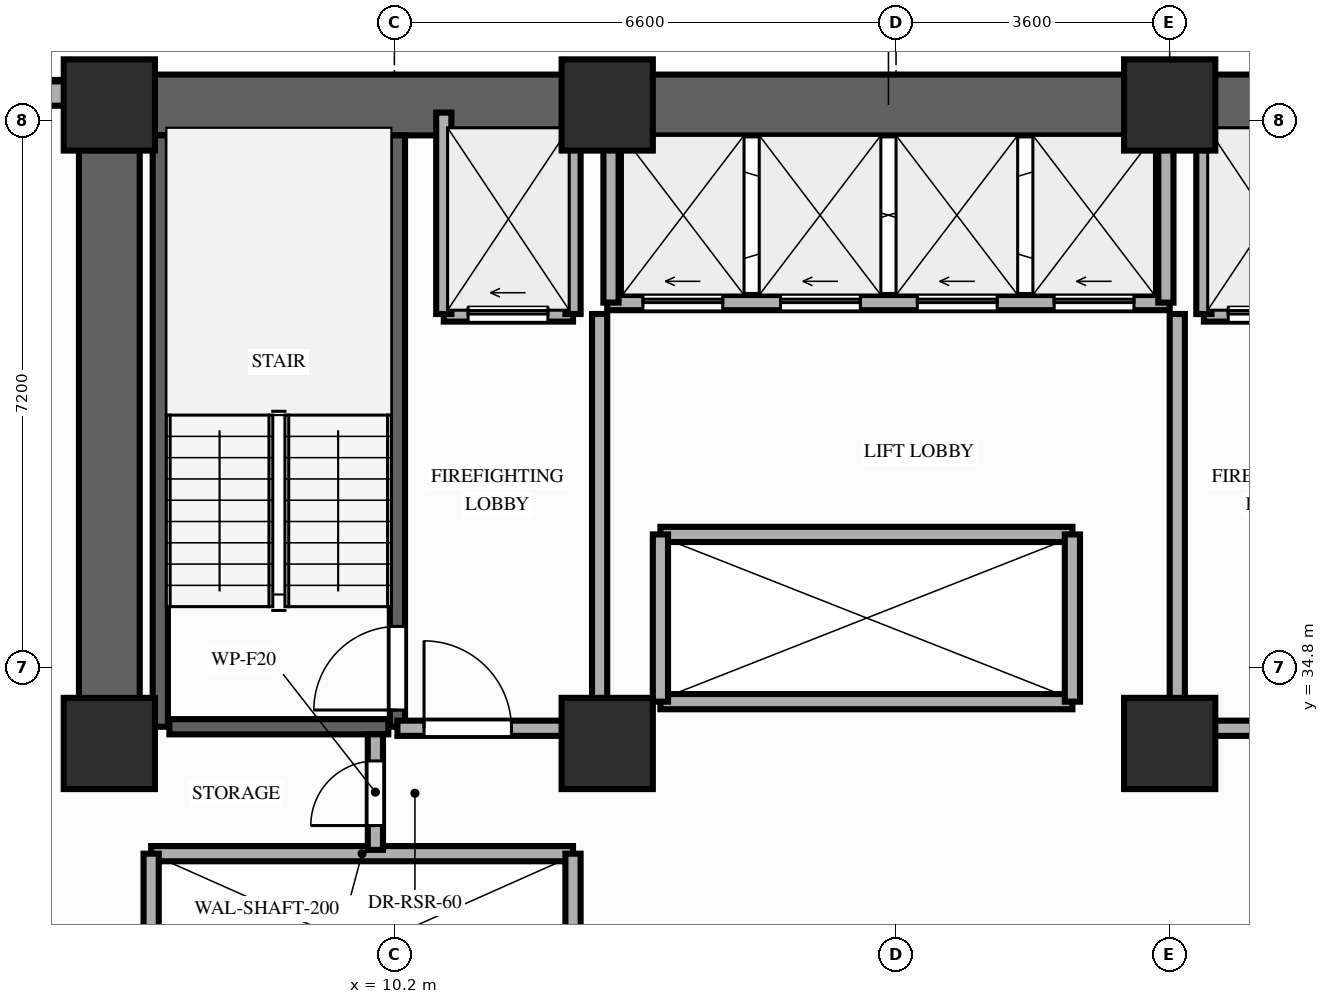
"""IFC4 building model, lengths in metres.
Left out: names, types, materials, properties, quantities, classifications, styles, units other than length and angle.
Written with IfcOpenShell. Run it as: python <this file> out.ifc"""

import sys

from ifc_helpers import new_model, si_unit, direction, frame, frame_2d, origin, origin_2d, place, context, subcontext, project, spatial, rectangle, extrude, element, fill, save


model = new_model("IFC4")
c1 = context("Model", 3, precision=1e-05, world=origin(), true_north=direction((0.0, 1.0)))
c2 = subcontext(c1, "Body", "Model", "MODEL_VIEW")
j1 = project(units=[si_unit("LENGTHUNIT", "METRE"), si_unit("PLANEANGLEUNIT", "RADIAN")], contexts=[c1])
p1 = place(None, origin())
s1 = spatial("IfcSite", under=j1, at=p1, CompositionType="ELEMENT")
p2 = place(p1, origin())
s2 = spatial("IfcBuilding", under=s1, at=p2, CompositionType="ELEMENT")
p3 = place(p2, frame((0.0, 0.0, 56.4)))
s3 = spatial("IfcBuildingStorey", under=s2, at=p3, CompositionType="ELEMENT", Elevation=56.4)
for number, where, z_axis, x_axis in (
    (1, (6.45, 33.8, 0.0), (0.0, 0.0, 1.0), (1.0, 0.0, 0.0)),
    (2, (13.0, 33.8, 0.0), (0.0, 0.0, 1.0), (1.0, 0.0, 0.0)),
    (3, (20.4, 33.8, 0.0), (0.0, 0.0, 1.0), (1.0, 0.0, 0.0)),
    (4, (6.45, 42.2, 0.0), (0.0, 0.0, 1.0), (1.0, 0.0, 0.0)),
    (5, (13.0, 42.2, 0.0), (0.0, 0.0, 1.0), (1.0, 0.0, 0.0)),
    (6, (20.4, 42.2, 0.0), (0.0, 0.0, 1.0), (1.0, 0.0, 0.0)),
):
    element("IfcColumn", number, at=place(p3, frame(where, z_axis=z_axis, x_axis=x_axis)), inside=s3, PredefinedType="COLUMN", context=c2, shape_type="SweptSolid", body=[
        extrude(rectangle(XDim=1.2, YDim=1.2, at=origin_2d()), origin(), (0.0, 0.0, 1.0), 3.2),
    ])
p4 = place(p3, frame((6.0, 42.35, 0.0), z_axis=(0.0, 0.0, 1.0), x_axis=(-1.0, 0.0, 0.0)))
e7 = element("IfcWall", 7, at=p4, inside=s3, PredefinedType="STANDARD", context=c2, shape_type="SweptSolid", body=[
    extrude(rectangle(XDim=2.0, YDim=0.32, at=frame_2d((1.0, 0.0))), origin(), (0.0, 0.0, 1.0), 3.02),
])
p5 = place(p3, frame((6.45, 42.2, 0.0), z_axis=(0.0, 0.0, 1.0), x_axis=(1.0, 0.0, 0.0)))
e8 = element("IfcWall", 8, at=p5, inside=s3, PredefinedType="SHEAR", context=c2, shape_type="SweptSolid", body=[
    extrude(rectangle(XDim=20.45, YDim=0.8, at=frame_2d((10.225, 0.0))), origin(), (0.0, 0.0, 1.0), 3.02),
])
p6 = place(p3, frame((6.45, 33.8, 0.0), z_axis=(0.0, 0.0, 1.0), x_axis=(0.0, 1.0, 0.0)))
e9 = element("IfcWall", 9, at=p6, inside=s3, PredefinedType="SHEAR", context=c2, shape_type="SweptSolid", body=[
    extrude(rectangle(XDim=7.95, YDim=0.8, at=frame_2d((3.975, 0.0))), origin(), (0.0, 0.0, 1.0), 3.02),
])
p7 = place(p3, frame((7.12, 34.02, 0.0), z_axis=(0.0, 0.0, 1.0), x_axis=(0.0, 1.0, 0.0)))
e10 = element("IfcWall", 10, at=p7, inside=s3, PredefinedType="SHEAR", context=c2, shape_type="SweptSolid", body=[
    extrude(rectangle(XDim=7.78, YDim=0.2, at=frame_2d((3.89, 0.0))), origin(), (0.0, 0.0, 1.0), 3.02),
])
p8 = place(p3, frame((10.24, 34.02, 0.0), z_axis=(0.0, 0.0, 1.0), x_axis=(0.0, 1.0, 0.0)))
e11 = element("IfcWall", 11, at=p8, inside=s3, PredefinedType="SHEAR", context=c2, shape_type="SweptSolid", body=[
    extrude(rectangle(XDim=7.78, YDim=0.2, at=frame_2d((3.89, 0.0))), origin(), (0.0, 0.0, 1.0), 3.02),
])
p9 = place(p8, frame((0.22, 0.0, 0.0)))
e12 = element("IfcOpeningElement", 12, at=p9, cuts=e11, PredefinedType="OPENING", context=c2, shape_type="SweptSolid", body=[
    extrude(rectangle(XDim=1.1, YDim=2.15, at=frame_2d((0.55, 1.075))), frame((0.0, 0.11, 0.0), z_axis=(0.0, -1.0, 0.0), x_axis=(1.0, 0.0, 0.0)), (0.0, 0.0, 1.0), 0.22),
])
p10 = place(p3, frame((7.24, 34.02, 0.0), z_axis=(0.0, 0.0, 1.0), x_axis=(1.0, 0.0, 0.0)))
e13 = element("IfcWall", 13, at=p10, inside=s3, PredefinedType="SHEAR", context=c2, shape_type="SweptSolid", body=[
    extrude(rectangle(XDim=2.88, YDim=0.2, at=frame_2d((1.44, 0.0))), origin(), (0.0, 0.0, 1.0), 3.02),
])
p11 = place(p3, frame((7.0, 32.35, 0.0), z_axis=(0.0, 0.0, 1.0), x_axis=(1.0, 0.0, 0.0)))
e14 = element("IfcWall", 14, at=p11, inside=s3, PredefinedType="MOVABLE", context=c2, shape_type="SweptSolid", body=[
    extrude(rectangle(XDim=5.55, YDim=0.2, at=frame_2d((2.775, 0.0))), origin(), (0.0, 0.0, 1.0), 3.02),
])
for number, where, z_axis, x_axis in (
    (15, (7.0, 29.85, 0.0), (0.0, 0.0, 1.0), (0.0, 1.0, 0.0)),
    (16, (12.55, 29.85, 0.0), (0.0, 0.0, 1.0), (0.0, 1.0, 0.0)),
):
    element("IfcWall", number, at=place(p3, frame(where, z_axis=z_axis, x_axis=x_axis)), inside=s3, PredefinedType="MOVABLE", context=c2, shape_type="SweptSolid", body=[
        extrude(rectangle(XDim=2.5, YDim=0.2, at=frame_2d((1.25, 0.0))), origin(), (0.0, 0.0, 1.0), 3.02),
    ])
p12 = place(p3, frame((10.85, 39.45, 0.0), z_axis=(0.0, 0.0, 1.0), x_axis=(1.0, 0.0, 0.0)))
e17 = element("IfcWall", 17, at=p12, inside=s3, PredefinedType="MOVABLE", context=c2, shape_type="SweptSolid", body=[
    extrude(rectangle(XDim=1.7, YDim=0.2, at=frame_2d((0.85, 0.0))), origin(), (0.0, 0.0, 1.0), 3.02),
])
p13 = place(p12, frame((0.32, 0.0, 0.0)))
e18 = element("IfcOpeningElement", 18, at=p13, cuts=e17, PredefinedType="OPENING", context=c2, shape_type="SweptSolid", body=[
    extrude(rectangle(XDim=1.05, YDim=2.15, at=frame_2d((0.525, 1.075))), frame((0.0, 0.11, 0.0), z_axis=(0.0, -1.0, 0.0), x_axis=(1.0, 0.0, 0.0)), (0.0, 0.0, 1.0), 0.22),
])
p14 = place(p3, frame((20.85, 39.45, 0.0), z_axis=(0.0, 0.0, 1.0), x_axis=(1.0, 0.0, 0.0)))
e19 = element("IfcWall", 19, at=p14, inside=s3, PredefinedType="MOVABLE", context=c2, shape_type="SweptSolid", body=[
    extrude(rectangle(XDim=1.7, YDim=0.2, at=frame_2d((0.85, 0.0))), origin(), (0.0, 0.0, 1.0), 3.02),
])
p15 = place(p14, frame((0.32, 0.0, 0.0)))
e20 = element("IfcOpeningElement", 20, at=p15, cuts=e19, PredefinedType="OPENING", context=c2, shape_type="SweptSolid", body=[
    extrude(rectangle(XDim=1.05, YDim=2.15, at=frame_2d((0.525, 1.075))), frame((0.0, 0.11, 0.0), z_axis=(0.0, -1.0, 0.0), x_axis=(1.0, 0.0, 0.0)), (0.0, 0.0, 1.0), 0.22),
])
for number, where, z_axis, x_axis in (
    (21, (10.85, 39.45, 0.0), (0.0, 0.0, 1.0), (0.0, 1.0, 0.0)),
    (22, (12.55, 39.45, 0.0), (0.0, 0.0, 1.0), (0.0, 1.0, 0.0)),
):
    element("IfcWall", number, at=place(p3, frame(where, z_axis=z_axis, x_axis=x_axis)), inside=s3, PredefinedType="MOVABLE", context=c2, shape_type="SweptSolid", body=[
        extrude(rectangle(XDim=2.65, YDim=0.2, at=frame_2d((1.325, 0.0))), origin(), (0.0, 0.0, 1.0), 2.4),
    ])
p16 = place(p3, frame((12.9, 34.0, 0.0), z_axis=(0.0, 0.0, 1.0), x_axis=(0.0, 1.0, 0.0)))
e23 = element("IfcWall", 23, at=p16, inside=s3, PredefinedType="PARTITIONING", context=c2, shape_type="SweptSolid", body=[
    extrude(rectangle(XDim=5.45, YDim=0.2, at=frame_2d((2.725, 0.0))), origin(), (0.0, 0.0, 1.0), 2.4),
])
p17 = place(p3, frame((10.24, 34.0, 0.0), z_axis=(0.0, 0.0, 1.0), x_axis=(1.0, 0.0, 0.0)))
e24 = element("IfcWall", 24, at=p17, inside=s3, PredefinedType="PARTITIONING", context=c2, shape_type="SweptSolid", body=[
    extrude(rectangle(XDim=2.66, YDim=0.2, at=frame_2d((1.33, 0.0))), origin(), (0.0, 0.0, 1.0), 2.4),
])
p18 = place(p17, frame((0.35, 0.0, 0.0)))
e25 = element("IfcOpeningElement", 25, at=p18, cuts=e24, PredefinedType="OPENING", context=c2, shape_type="SweptSolid", body=[
    extrude(rectangle(XDim=1.15, YDim=2.15, at=frame_2d((0.575, 1.075))), frame((0.0, 0.11, 0.0), z_axis=(0.0, -1.0, 0.0), x_axis=(1.0, 0.0, 0.0)), (0.0, 0.0, 1.0), 0.22),
])
p19 = place(p3, frame((20.85, 39.45, 0.0), z_axis=(0.0, 0.0, 1.0), x_axis=(0.0, 1.0, 0.0)))
e26 = element("IfcWall", 26, at=p19, inside=s3, PredefinedType="MOVABLE", context=c2, shape_type="SweptSolid", body=[
    extrude(rectangle(XDim=2.65, YDim=0.2, at=frame_2d((1.325, 0.0))), origin(), (0.0, 0.0, 1.0), 2.4),
])
p20 = place(p3, frame((20.5, 34.0, 0.0), z_axis=(0.0, 0.0, 1.0), x_axis=(0.0, 1.0, 0.0)))
e27 = element("IfcWall", 27, at=p20, inside=s3, PredefinedType="PARTITIONING", context=c2, shape_type="SweptSolid", body=[
    extrude(rectangle(XDim=5.45, YDim=0.2, at=frame_2d((2.725, 0.0))), origin(), (0.0, 0.0, 1.0), 2.4),
])
p21 = place(p3, frame((20.5, 34.0, 0.0), z_axis=(0.0, 0.0, 1.0), x_axis=(1.0, 0.0, 0.0)))
e28 = element("IfcWall", 28, at=p21, inside=s3, PredefinedType="PARTITIONING", context=c2, shape_type="SweptSolid", body=[
    extrude(rectangle(XDim=2.6, YDim=0.2, at=frame_2d((1.3, 0.0))), origin(), (0.0, 0.0, 1.0), 2.4),
])
p22 = place(p21, frame((1.05, 0.0, 0.0)))
e29 = element("IfcOpeningElement", 29, at=p22, cuts=e28, PredefinedType="OPENING", context=c2, shape_type="SweptSolid", body=[
    extrude(rectangle(XDim=1.15, YDim=2.15, at=frame_2d((0.575, 1.075))), frame((0.0, 0.11, 0.0), z_axis=(0.0, -1.0, 0.0), x_axis=(1.0, 0.0, 0.0)), (0.0, 0.0, 1.0), 0.22),
])
p23 = place(p3, frame((9.95, 32.4, 0.0), z_axis=(0.0, 0.0, 1.0), x_axis=(0.0, 1.0, 0.0)))
e30 = element("IfcWall", 30, at=p23, inside=s3, PredefinedType="PARTITIONING", context=c2, shape_type="SweptSolid", body=[
    extrude(rectangle(XDim=1.52, YDim=0.2, at=frame_2d((0.76, 0.0))), origin(), (0.0, 0.0, 1.0), 2.4),
])
p24 = place(p23, frame((0.32, 0.0, 0.0)))
e31 = element("IfcOpeningElement", 31, at=p24, cuts=e30, PredefinedType="OPENING", context=c2, shape_type="SweptSolid", body=[
    extrude(rectangle(XDim=0.85, YDim=2.05, at=frame_2d((0.425, 1.025))), frame((0.0, 0.11, 0.0), z_axis=(0.0, -1.0, 0.0), x_axis=(1.0, 0.0, 0.0)), (0.0, 0.0, 1.0), 0.22),
])
p25 = place(p3, frame((13.0, 39.6, 0.0), z_axis=(0.0, 0.0, 1.0), x_axis=(1.0, 0.0, 0.0)))
e32 = element("IfcWall", 32, at=p25, inside=s3, PredefinedType="MOVABLE", context=c2, shape_type="SweptSolid", body=[
    extrude(rectangle(XDim=7.4, YDim=0.2, at=frame_2d((3.7, 0.0))), origin(), (0.0, 0.0, 1.0), 3.02),
])
p26 = place(p25, frame((0.47, 0.0, 0.0)))
e33 = element("IfcOpeningElement", 33, at=p26, cuts=e32, PredefinedType="OPENING", context=c2, shape_type="SweptSolid", body=[
    extrude(rectangle(XDim=1.05, YDim=2.15, at=frame_2d((0.525, 1.075))), frame((0.0, 0.11, 0.0), z_axis=(0.0, -1.0, 0.0), x_axis=(1.0, 0.0, 0.0)), (0.0, 0.0, 1.0), 0.22),
])
p27 = place(p25, frame((2.28, 0.0, 0.0)))
e34 = element("IfcOpeningElement", 34, at=p27, cuts=e32, PredefinedType="OPENING", context=c2, shape_type="SweptSolid", body=[
    extrude(rectangle(XDim=1.05, YDim=2.15, at=frame_2d((0.525, 1.075))), frame((0.0, 0.11, 0.0), z_axis=(0.0, -1.0, 0.0), x_axis=(1.0, 0.0, 0.0)), (0.0, 0.0, 1.0), 0.22),
])
p28 = place(p25, frame((4.08, 0.0, 0.0)))
e35 = element("IfcOpeningElement", 35, at=p28, cuts=e32, PredefinedType="OPENING", context=c2, shape_type="SweptSolid", body=[
    extrude(rectangle(XDim=1.05, YDim=2.15, at=frame_2d((0.525, 1.075))), frame((0.0, 0.11, 0.0), z_axis=(0.0, -1.0, 0.0), x_axis=(1.0, 0.0, 0.0)), (0.0, 0.0, 1.0), 0.22),
])
p29 = place(p25, frame((5.88, 0.0, 0.0)))
e36 = element("IfcOpeningElement", 36, at=p29, cuts=e32, PredefinedType="OPENING", context=c2, shape_type="SweptSolid", body=[
    extrude(rectangle(XDim=1.05, YDim=2.15, at=frame_2d((0.525, 1.075))), frame((0.0, 0.11, 0.0), z_axis=(0.0, -1.0, 0.0), x_axis=(1.0, 0.0, 0.0)), (0.0, 0.0, 1.0), 0.22),
])
for number, where, z_axis, x_axis in (
    (37, (13.05, 39.6, 0.0), (0.0, 0.0, 1.0), (0.0, 1.0, 0.0)),
    (38, (20.35, 39.6, 0.0), (0.0, 0.0, 1.0), (0.0, 1.0, 0.0)),
):
    element("IfcWall", number, at=place(p3, frame(where, z_axis=z_axis, x_axis=x_axis)), inside=s3, PredefinedType="MOVABLE", context=c2, shape_type="SweptSolid", body=[
        extrude(rectangle(XDim=2.18, YDim=0.2, at=frame_2d((1.09, 0.0))), origin(), (0.0, 0.0, 1.0), 3.02),
    ])
for number, where, z_axis, x_axis in (
    (39, (13.7, 34.35, 0.0), (0.0, 0.0, 1.0), (1.0, 0.0, 0.0)),
    (40, (13.7, 36.55, 0.0), (0.0, 0.0, 1.0), (1.0, 0.0, 0.0)),
):
    element("IfcWall", number, at=place(p3, frame(where, z_axis=z_axis, x_axis=x_axis)), inside=s3, PredefinedType="MOVABLE", context=c2, shape_type="SweptSolid", body=[
        extrude(rectangle(XDim=5.42, YDim=0.2, at=frame_2d((2.71, 0.0))), origin(), (0.0, 0.0, 1.0), 3.02),
    ])
for number, where, z_axis, x_axis in (
    (41, (13.7, 34.35, 0.0), (0.0, 0.0, 1.0), (0.0, 1.0, 0.0)),
    (42, (19.12, 34.35, 0.0), (0.0, 0.0, 1.0), (0.0, 1.0, 0.0)),
):
    element("IfcWall", number, at=place(p3, frame(where, z_axis=z_axis, x_axis=x_axis)), inside=s3, PredefinedType="MOVABLE", context=c2, shape_type="SweptSolid", body=[
        extrude(rectangle(XDim=2.2, YDim=0.2, at=frame_2d((1.1, 0.0))), origin(), (0.0, 0.0, 1.0), 3.02),
    ])
p30 = place(p9, origin())
e43 = element("IfcDoor", 43, at=p30, inside=s3, OperationType="SINGLE_SWING_LEFT", PredefinedType="DOOR", context=c2, shape_type="SweptSolid", body=[
    extrude(rectangle(XDim=1.1, YDim=2.15, at=frame_2d((0.55, 1.075))), frame((0.0, 0.025, 0.0), z_axis=(0.0, -1.0, 0.0), x_axis=(1.0, 0.0, 0.0)), (0.0, 0.0, 1.0), 0.05),
])
fill(e12, e43)
p31 = place(p13, origin())
e44 = element("IfcDoor", 44, at=p31, inside=s3, OperationType="SLIDING_TO_LEFT", PredefinedType="DOOR", context=c2, shape_type="SweptSolid", body=[
    extrude(rectangle(XDim=1.05, YDim=2.15, at=frame_2d((0.525, 1.075))), frame((0.0, 0.025, 0.0), z_axis=(0.0, -1.0, 0.0), x_axis=(1.0, 0.0, 0.0)), (0.0, 0.0, 1.0), 0.05),
])
fill(e18, e44)
p32 = place(p15, origin())
e45 = element("IfcDoor", 45, at=p32, inside=s3, OperationType="SLIDING_TO_LEFT", PredefinedType="DOOR", context=c2, shape_type="SweptSolid", body=[
    extrude(rectangle(XDim=1.05, YDim=2.15, at=frame_2d((0.525, 1.075))), frame((0.0, 0.025, 0.0), z_axis=(0.0, -1.0, 0.0), x_axis=(1.0, 0.0, 0.0)), (0.0, 0.0, 1.0), 0.05),
])
fill(e20, e45)
p33 = place(p18, origin())
e46 = element("IfcDoor", 46, at=p33, inside=s3, OperationType="SINGLE_SWING_LEFT", PredefinedType="DOOR", context=c2, shape_type="SweptSolid", body=[
    extrude(rectangle(XDim=1.15, YDim=2.15, at=frame_2d((0.575, 1.075))), frame((0.0, 0.025, 0.0), z_axis=(0.0, -1.0, 0.0), x_axis=(1.0, 0.0, 0.0)), (0.0, 0.0, 1.0), 0.05),
])
fill(e25, e46)
p34 = place(p24, origin())
e47 = element("IfcDoor", 47, at=p34, inside=s3, OperationType="SINGLE_SWING_LEFT", PredefinedType="DOOR", context=c2, shape_type="SweptSolid", body=[
    extrude(rectangle(XDim=0.85, YDim=2.05, at=frame_2d((0.425, 1.025))), frame((0.0, 0.025, 0.0), z_axis=(0.0, -1.0, 0.0), x_axis=(1.0, 0.0, 0.0)), (0.0, 0.0, 1.0), 0.05),
])
fill(e31, e47)
p35 = place(p26, origin())
e48 = element("IfcDoor", 48, at=p35, inside=s3, OperationType="SLIDING_TO_LEFT", PredefinedType="DOOR", context=c2, shape_type="SweptSolid", body=[
    extrude(rectangle(XDim=1.05, YDim=2.15, at=frame_2d((0.525, 1.075))), frame((0.0, 0.025, 0.0), z_axis=(0.0, -1.0, 0.0), x_axis=(1.0, 0.0, 0.0)), (0.0, 0.0, 1.0), 0.05),
])
fill(e33, e48)
p36 = place(p27, origin())
e49 = element("IfcDoor", 49, at=p36, inside=s3, OperationType="SLIDING_TO_LEFT", PredefinedType="DOOR", context=c2, shape_type="SweptSolid", body=[
    extrude(rectangle(XDim=1.05, YDim=2.15, at=frame_2d((0.525, 1.075))), frame((0.0, 0.025, 0.0), z_axis=(0.0, -1.0, 0.0), x_axis=(1.0, 0.0, 0.0)), (0.0, 0.0, 1.0), 0.05),
])
fill(e34, e49)
p37 = place(p28, origin())
e50 = element("IfcDoor", 50, at=p37, inside=s3, OperationType="SLIDING_TO_LEFT", PredefinedType="DOOR", context=c2, shape_type="SweptSolid", body=[
    extrude(rectangle(XDim=1.05, YDim=2.15, at=frame_2d((0.525, 1.075))), frame((0.0, 0.025, 0.0), z_axis=(0.0, -1.0, 0.0), x_axis=(1.0, 0.0, 0.0)), (0.0, 0.0, 1.0), 0.05),
])
fill(e35, e50)
p38 = place(p29, origin())
e51 = element("IfcDoor", 51, at=p38, inside=s3, OperationType="SLIDING_TO_LEFT", PredefinedType="DOOR", context=c2, shape_type="SweptSolid", body=[
    extrude(rectangle(XDim=1.05, YDim=2.15, at=frame_2d((0.525, 1.075))), frame((0.0, 0.025, 0.0), z_axis=(0.0, -1.0, 0.0), x_axis=(1.0, 0.0, 0.0)), (0.0, 0.0, 1.0), 0.05),
])
fill(e36, e51)
save(model, sys.argv[1])
